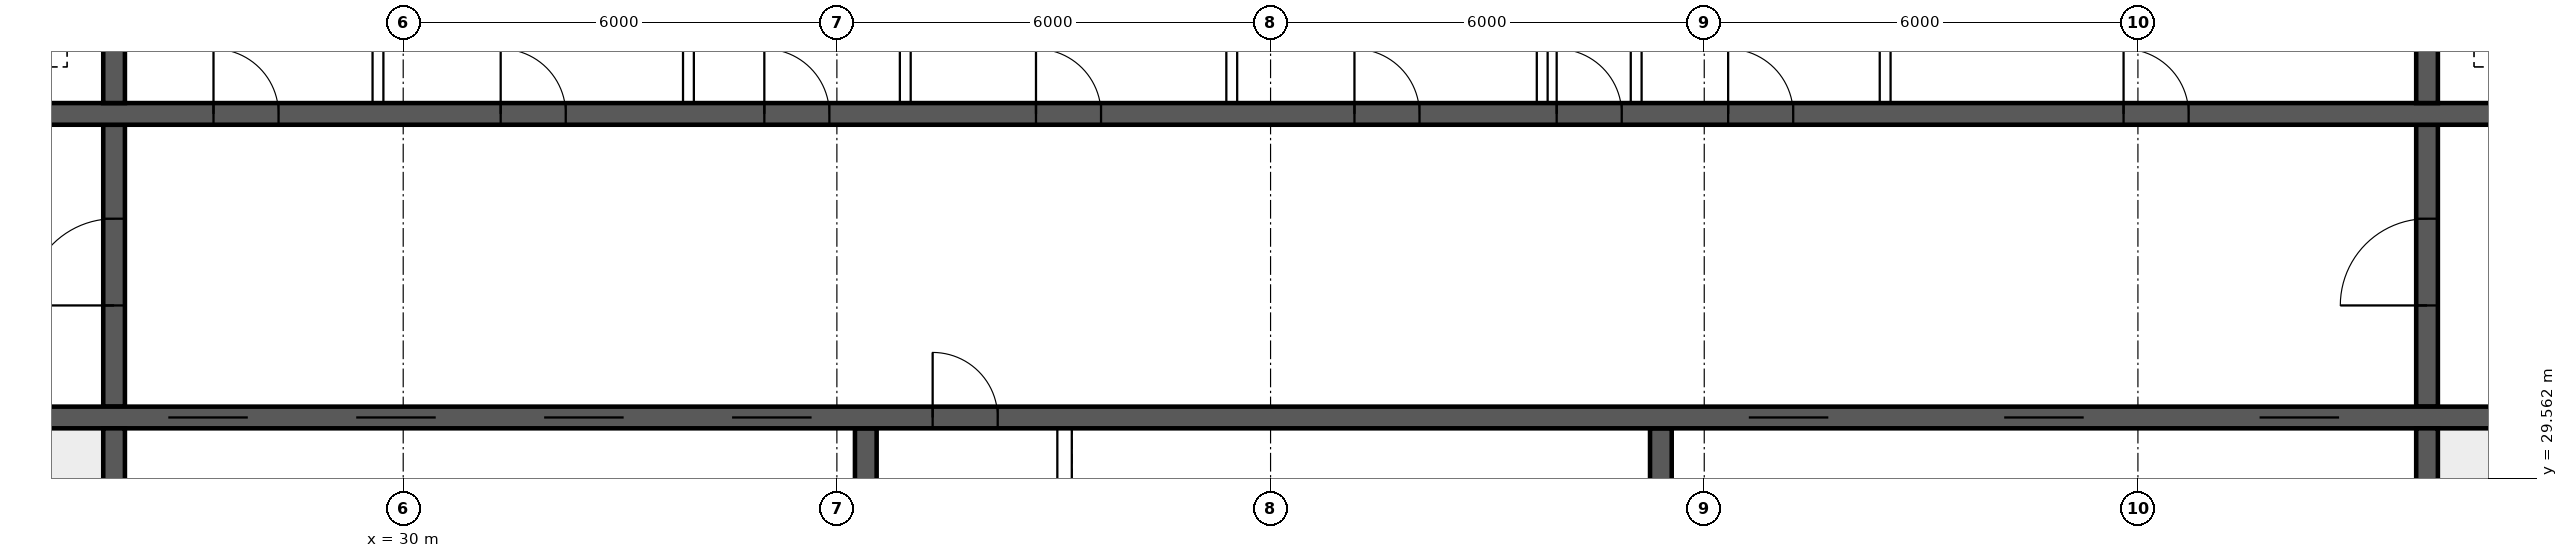
"""IFC4 building model, lengths in metres.
Left out: names, types, materials, properties, quantities, classifications, styles, units other than length and angle.
Written with IfcOpenShell. Run it as: python <this file> out.ifc"""

import sys

from ifc_helpers import new_model, si_unit, direction, frame, frame_2d, origin, place, context, subcontext, project, spatial, rectangle, extrude, element, fill, save


model = new_model("IFC4")
c1 = context("Model", 3, precision=1e-05, world=origin(), true_north=direction((0.0, 1.0)))
c2 = subcontext(c1, "Body", "Model", "MODEL_VIEW")
j1 = project(units=[si_unit("LENGTHUNIT", "METRE"), si_unit("PLANEANGLEUNIT", "RADIAN")], contexts=[c1])
p1 = place(None, origin())
s1 = spatial("IfcSite", under=j1, at=p1, CompositionType="ELEMENT")
p2 = place(p1, origin())
s2 = spatial("IfcBuilding", under=s1, at=p2, CompositionType="ELEMENT")
p3 = place(p2, frame((0.0, 0.0, 110.65)))
s3 = spatial("IfcBuildingStorey", under=s2, at=p3, CompositionType="ELEMENT", Elevation=110.65)
p4 = place(p3, frame((18.475, 30.4, 0.0), z_axis=(0.0, 0.0, 1.0), x_axis=(1.0, 0.0, 0.0)))
e1 = element("IfcWall", 1, at=p4, inside=s3, PredefinedType="SHEAR", context=c2, shape_type="SweptSolid", body=[
    extrude(rectangle(XDim=47.05, YDim=0.3, at=frame_2d((23.525, 0.0))), origin(), (0.0, 0.0, 1.0), 3.75),
])
p5 = place(p4, frame((0.4, 0.0, 0.0)))
e2 = element("IfcOpeningElement", 2, at=p5, cuts=e1, PredefinedType="OPENING", context=c2, shape_type="SweptSolid", body=[
    extrude(rectangle(XDim=1.0, YDim=2.1, at=frame_2d((0.5, 1.05))), frame((0.0, 0.16, 0.0), z_axis=(0.0, -1.0, 0.0), x_axis=(1.0, 0.0, 0.0)), (0.0, 0.0, 1.0), 0.32),
])
p6 = place(p4, frame((45.65, 0.0, 0.0)))
e3 = element("IfcOpeningElement", 3, at=p6, cuts=e1, PredefinedType="OPENING", context=c2, shape_type="SweptSolid", body=[
    extrude(rectangle(XDim=1.0, YDim=2.1, at=frame_2d((0.5, 1.05))), frame((0.0, 0.16, 0.0), z_axis=(0.0, -1.0, 0.0), x_axis=(1.0, 0.0, 0.0)), (0.0, 0.0, 1.0), 0.32),
])
p7 = place(p4, frame((8.275, 0.0, 0.0)))
e4 = element("IfcOpeningElement", 4, at=p7, cuts=e1, PredefinedType="OPENING", context=c2, shape_type="SweptSolid", body=[
    extrude(rectangle(XDim=1.1, YDim=2.1, at=frame_2d((0.55, 1.05))), frame((0.0, 0.16, 0.0), z_axis=(0.0, -1.0, 0.0), x_axis=(1.0, 0.0, 0.0)), (0.0, 0.0, 1.0), 0.32),
])
p8 = place(p4, frame((10.875, 0.0, 0.0)))
e5 = element("IfcOpeningElement", 5, at=p8, cuts=e1, PredefinedType="OPENING", context=c2, shape_type="SweptSolid", body=[
    extrude(rectangle(XDim=1.1, YDim=2.1, at=frame_2d((0.55, 1.05))), frame((0.0, 0.16, 0.0), z_axis=(0.0, -1.0, 0.0), x_axis=(1.0, 0.0, 0.0)), (0.0, 0.0, 1.0), 0.32),
])
p9 = place(p4, frame((13.475, 0.0, 0.0)))
e6 = element("IfcOpeningElement", 6, at=p9, cuts=e1, PredefinedType="OPENING", context=c2, shape_type="SweptSolid", body=[
    extrude(rectangle(XDim=1.1, YDim=2.1, at=frame_2d((0.55, 1.05))), frame((0.0, 0.16, 0.0), z_axis=(0.0, -1.0, 0.0), x_axis=(1.0, 0.0, 0.0)), (0.0, 0.0, 1.0), 0.32),
])
p10 = place(p4, frame((16.075, 0.0, 0.0)))
e7 = element("IfcOpeningElement", 7, at=p10, cuts=e1, PredefinedType="OPENING", context=c2, shape_type="SweptSolid", body=[
    extrude(rectangle(XDim=1.1, YDim=2.1, at=frame_2d((0.55, 1.05))), frame((0.0, 0.16, 0.0), z_axis=(0.0, -1.0, 0.0), x_axis=(1.0, 0.0, 0.0)), (0.0, 0.0, 1.0), 0.32),
])
p11 = place(p4, frame((18.85, 0.0, 0.0)))
e8 = element("IfcOpeningElement", 8, at=p11, cuts=e1, PredefinedType="OPENING", context=c2, shape_type="SweptSolid", body=[
    extrude(rectangle(XDim=0.9, YDim=2.1, at=frame_2d((0.45, 1.05))), frame((0.0, 0.16, 0.0), z_axis=(0.0, -1.0, 0.0), x_axis=(1.0, 0.0, 0.0)), (0.0, 0.0, 1.0), 0.32),
])
p12 = place(p4, frame((30.142, 0.0, 0.0)))
e9 = element("IfcOpeningElement", 9, at=p12, cuts=e1, PredefinedType="OPENING", context=c2, shape_type="SweptSolid", body=[
    extrude(rectangle(XDim=1.1, YDim=2.1, at=frame_2d((0.55, 1.05))), frame((0.0, 0.16, 0.0), z_axis=(0.0, -1.0, 0.0), x_axis=(1.0, 0.0, 0.0)), (0.0, 0.0, 1.0), 0.32),
])
p13 = place(p4, frame((33.675, 0.0, 0.0)))
e10 = element("IfcOpeningElement", 10, at=p13, cuts=e1, PredefinedType="OPENING", context=c2, shape_type="SweptSolid", body=[
    extrude(rectangle(XDim=1.1, YDim=2.1, at=frame_2d((0.55, 1.05))), frame((0.0, 0.16, 0.0), z_axis=(0.0, -1.0, 0.0), x_axis=(1.0, 0.0, 0.0)), (0.0, 0.0, 1.0), 0.32),
])
p14 = place(p4, frame((37.208, 0.0, 0.0)))
e11 = element("IfcOpeningElement", 11, at=p14, cuts=e1, PredefinedType="OPENING", context=c2, shape_type="SweptSolid", body=[
    extrude(rectangle(XDim=1.1, YDim=2.1, at=frame_2d((0.55, 1.05))), frame((0.0, 0.16, 0.0), z_axis=(0.0, -1.0, 0.0), x_axis=(1.0, 0.0, 0.0)), (0.0, 0.0, 1.0), 0.32),
])
p15 = place(p3, frame((18.475, 34.6, 0.0), z_axis=(0.0, 0.0, 1.0), x_axis=(1.0, 0.0, 0.0)))
e12 = element("IfcWall", 12, at=p15, inside=s3, PredefinedType="SHEAR", context=c2, shape_type="SweptSolid", body=[
    extrude(rectangle(XDim=47.05, YDim=0.3, at=frame_2d((23.525, 0.0))), origin(), (0.0, 0.0, 1.0), 3.75),
])
p16 = place(p15, frame((0.9, 0.0, 0.0)))
e13 = element("IfcOpeningElement", 13, at=p16, cuts=e12, PredefinedType="OPENING", context=c2, shape_type="SweptSolid", body=[
    extrude(rectangle(XDim=1.1, YDim=2.1, at=frame_2d((0.55, 1.05))), frame((0.0, 0.16, 0.0), z_axis=(0.0, -1.0, 0.0), x_axis=(1.0, 0.0, 0.0)), (0.0, 0.0, 1.0), 0.32),
])
p17 = place(p15, frame((45.05, 0.0, 0.0)))
e14 = element("IfcOpeningElement", 14, at=p17, cuts=e12, PredefinedType="OPENING", context=c2, shape_type="SweptSolid", body=[
    extrude(rectangle(XDim=1.1, YDim=2.1, at=frame_2d((0.55, 1.05))), frame((0.0, 0.16, 0.0), z_axis=(0.0, -1.0, 0.0), x_axis=(1.0, 0.0, 0.0)), (0.0, 0.0, 1.0), 0.32),
])
p18 = place(p15, frame((4.125, 0.0, 0.0)))
e15 = element("IfcOpeningElement", 15, at=p18, cuts=e12, PredefinedType="OPENING", context=c2, shape_type="SweptSolid", body=[
    extrude(rectangle(XDim=0.9, YDim=2.1, at=frame_2d((0.45, 1.05))), frame((0.0, 0.16, 0.0), z_axis=(0.0, -1.0, 0.0), x_axis=(1.0, 0.0, 0.0)), (0.0, 0.0, 1.0), 0.32),
])
p19 = place(p15, frame((42.025, 0.0, 0.0)))
e16 = element("IfcOpeningElement", 16, at=p19, cuts=e12, PredefinedType="OPENING", context=c2, shape_type="SweptSolid", body=[
    extrude(rectangle(XDim=0.9, YDim=2.1, at=frame_2d((0.45, 1.05))), frame((0.0, 0.16, 0.0), z_axis=(0.0, -1.0, 0.0), x_axis=(1.0, 0.0, 0.0)), (0.0, 0.0, 1.0), 0.32),
])
p20 = place(p15, frame((8.9, 0.0, 0.0)))
e17 = element("IfcOpeningElement", 17, at=p20, cuts=e12, PredefinedType="OPENING", context=c2, shape_type="SweptSolid", body=[
    extrude(rectangle(XDim=0.9, YDim=2.1, at=frame_2d((0.45, 1.05))), frame((0.0, 0.16, 0.0), z_axis=(0.0, -1.0, 0.0), x_axis=(1.0, 0.0, 0.0)), (0.0, 0.0, 1.0), 0.32),
])
p21 = place(p15, frame((12.874, 0.0, 0.0)))
e18 = element("IfcOpeningElement", 18, at=p21, cuts=e12, PredefinedType="OPENING", context=c2, shape_type="SweptSolid", body=[
    extrude(rectangle(XDim=0.9, YDim=2.1, at=frame_2d((0.45, 1.05))), frame((0.0, 0.16, 0.0), z_axis=(0.0, -1.0, 0.0), x_axis=(1.0, 0.0, 0.0)), (0.0, 0.0, 1.0), 0.32),
])
p22 = place(p15, frame((16.521, 0.0, 0.0)))
e19 = element("IfcOpeningElement", 19, at=p22, cuts=e12, PredefinedType="OPENING", context=c2, shape_type="SweptSolid", body=[
    extrude(rectangle(XDim=0.9, YDim=2.1, at=frame_2d((0.45, 1.05))), frame((0.0, 0.16, 0.0), z_axis=(0.0, -1.0, 0.0), x_axis=(1.0, 0.0, 0.0)), (0.0, 0.0, 1.0), 0.32),
])
p23 = place(p15, frame((20.28, 0.0, 0.0)))
e20 = element("IfcOpeningElement", 20, at=p23, cuts=e12, PredefinedType="OPENING", context=c2, shape_type="SweptSolid", body=[
    extrude(rectangle(XDim=0.9, YDim=2.1, at=frame_2d((0.45, 1.05))), frame((0.0, 0.16, 0.0), z_axis=(0.0, -1.0, 0.0), x_axis=(1.0, 0.0, 0.0)), (0.0, 0.0, 1.0), 0.32),
])
p24 = place(p15, frame((24.686, 0.0, 0.0)))
e21 = element("IfcOpeningElement", 21, at=p24, cuts=e12, PredefinedType="OPENING", context=c2, shape_type="SweptSolid", body=[
    extrude(rectangle(XDim=0.9, YDim=2.1, at=frame_2d((0.45, 1.05))), frame((0.0, 0.16, 0.0), z_axis=(0.0, -1.0, 0.0), x_axis=(1.0, 0.0, 0.0)), (0.0, 0.0, 1.0), 0.32),
])
p25 = place(p15, frame((27.483, 0.0, 0.0)))
e22 = element("IfcOpeningElement", 22, at=p25, cuts=e12, PredefinedType="OPENING", context=c2, shape_type="SweptSolid", body=[
    extrude(rectangle(XDim=0.9, YDim=2.1, at=frame_2d((0.45, 1.05))), frame((0.0, 0.16, 0.0), z_axis=(0.0, -1.0, 0.0), x_axis=(1.0, 0.0, 0.0)), (0.0, 0.0, 1.0), 0.32),
])
p26 = place(p15, frame((29.856, 0.0, 0.0)))
e23 = element("IfcOpeningElement", 23, at=p26, cuts=e12, PredefinedType="OPENING", context=c2, shape_type="SweptSolid", body=[
    extrude(rectangle(XDim=0.9, YDim=2.1, at=frame_2d((0.45, 1.05))), frame((0.0, 0.16, 0.0), z_axis=(0.0, -1.0, 0.0), x_axis=(1.0, 0.0, 0.0)), (0.0, 0.0, 1.0), 0.32),
])
p27 = place(p15, frame((35.326, 0.0, 0.0)))
e24 = element("IfcOpeningElement", 24, at=p27, cuts=e12, PredefinedType="OPENING", context=c2, shape_type="SweptSolid", body=[
    extrude(rectangle(XDim=0.9, YDim=2.1, at=frame_2d((0.45, 1.05))), frame((0.0, 0.16, 0.0), z_axis=(0.0, -1.0, 0.0), x_axis=(1.0, 0.0, 0.0)), (0.0, 0.0, 1.0), 0.32),
])
for number, where, z_axis, x_axis in (
    (25, (26.0, 26.275, 0.0), (0.0, 0.0, 1.0), (0.0, 1.0, 0.0)),
    (26, (58.0, 26.275, 0.0), (0.0, 0.0, 1.0), (0.0, 1.0, 0.0)),
):
    element("IfcWall", number, at=place(p3, frame(where, z_axis=z_axis, x_axis=x_axis)), inside=s3, PredefinedType="SHEAR", context=c2, shape_type="SweptSolid", body=[
        extrude(rectangle(XDim=3.975, YDim=0.3, at=frame_2d((1.988, 0.0))), origin(), (0.0, 0.0, 1.0), 3.75),
    ])
p28 = place(p3, frame((26.0, 30.55, 0.0), z_axis=(0.0, 0.0, 1.0), x_axis=(0.0, 1.0, 0.0)))
e27 = element("IfcWall", 27, at=p28, inside=s3, PredefinedType="SHEAR", context=c2, shape_type="SweptSolid", body=[
    extrude(rectangle(XDim=3.9, YDim=0.3, at=frame_2d((1.95, 0.0))), origin(), (0.0, 0.0, 1.0), 3.75),
])
p29 = place(p28, frame((1.4, 0.0, 0.0)))
e28 = element("IfcOpeningElement", 28, at=p29, cuts=e27, PredefinedType="OPENING", context=c2, shape_type="SweptSolid", body=[
    extrude(rectangle(XDim=1.2, YDim=2.1, at=frame_2d((0.6, 1.05))), frame((0.0, 0.16, 0.0), z_axis=(0.0, -1.0, 0.0), x_axis=(1.0, 0.0, 0.0)), (0.0, 0.0, 1.0), 0.32),
])
p30 = place(p3, frame((58.0, 30.55, 0.0), z_axis=(0.0, 0.0, 1.0), x_axis=(0.0, 1.0, 0.0)))
e29 = element("IfcWall", 29, at=p30, inside=s3, PredefinedType="SHEAR", context=c2, shape_type="SweptSolid", body=[
    extrude(rectangle(XDim=3.9, YDim=0.3, at=frame_2d((1.95, 0.0))), origin(), (0.0, 0.0, 1.0), 3.75),
])
p31 = place(p30, frame((1.4, 0.0, 0.0)))
e30 = element("IfcOpeningElement", 30, at=p31, cuts=e29, PredefinedType="OPENING", context=c2, shape_type="SweptSolid", body=[
    extrude(rectangle(XDim=1.2, YDim=2.1, at=frame_2d((0.6, 1.05))), frame((0.0, 0.16, 0.0), z_axis=(0.0, -1.0, 0.0), x_axis=(1.0, 0.0, 0.0)), (0.0, 0.0, 1.0), 0.32),
])
for number, where, z_axis, x_axis in (
    (31, (26.0, 34.75, 0.0), (0.0, 0.0, 1.0), (0.0, 1.0, 0.0)),
    (32, (58.0, 34.75, 0.0), (0.0, 0.0, 1.0), (0.0, 1.0, 0.0)),
):
    element("IfcWall", number, at=place(p3, frame(where, z_axis=z_axis, x_axis=x_axis)), inside=s3, PredefinedType="SHEAR", context=c2, shape_type="SweptSolid", body=[
        extrude(rectangle(XDim=2.975, YDim=0.3, at=frame_2d((1.488, 0.0))), origin(), (0.0, 0.0, 1.0), 3.75),
    ])
for number, where, z_axis, x_axis in (
    (33, (36.4, 26.275, 0.0), (0.0, 0.0, 1.0), (0.0, 1.0, 0.0)),
    (34, (47.4, 26.275, 0.0), (0.0, 0.0, 1.0), (0.0, 1.0, 0.0)),
):
    element("IfcWall", number, at=place(p3, frame(where, z_axis=z_axis, x_axis=x_axis)), inside=s3, PredefinedType="SHEAR", context=c2, shape_type="SweptSolid", body=[
        extrude(rectangle(XDim=3.975, YDim=0.3, at=frame_2d((1.988, 0.0))), origin(), (0.0, 0.0, 1.0), 3.75),
    ])
for number, where, z_axis, x_axis in (
    (35, (29.651, 34.75, 0.0), (0.0, 0.0, 1.0), (0.0, 1.0, 0.0)),
    (36, (33.946, 34.75, 0.0), (0.0, 0.0, 1.0), (0.0, 1.0, 0.0)),
    (37, (36.946, 34.75, 0.0), (0.0, 0.0, 1.0), (0.0, 1.0, 0.0)),
    (38, (41.463, 34.75, 0.0), (0.0, 0.0, 1.0), (0.0, 1.0, 0.0)),
    (39, (45.758, 34.75, 0.0), (0.0, 0.0, 1.0), (0.0, 1.0, 0.0)),
    (40, (47.058, 34.75, 0.0), (0.0, 0.0, 1.0), (0.0, 1.0, 0.0)),
    (41, (50.503, 34.75, 0.0), (0.0, 0.0, 1.0), (0.0, 1.0, 0.0)),
):
    element("IfcWall", number, at=place(p3, frame(where, z_axis=z_axis, x_axis=x_axis)), inside=s3, PredefinedType="SOLIDWALL", context=c2, shape_type="SweptSolid", body=[
        extrude(rectangle(XDim=2.975, YDim=0.15, at=frame_2d((1.488, 0.0))), origin(), (0.0, 0.0, 1.0), 3.3),
    ])
p32 = place(p3, frame((39.15, 26.275, 0.0), z_axis=(0.0, 0.0, 1.0), x_axis=(0.0, 1.0, 0.0)))
e42 = element("IfcWall", 42, at=p32, inside=s3, PredefinedType="SOLIDWALL", context=c2, shape_type="SweptSolid", body=[
    extrude(rectangle(XDim=3.975, YDim=0.2, at=frame_2d((1.988, 0.0))), origin(), (0.0, 0.0, 1.0), 3.3),
])
p33 = place(p29, origin())
e43 = element("IfcDoor", 43, at=p33, inside=s3, OperationType="SINGLE_SWING_LEFT", PredefinedType="DOOR", context=c2, shape_type="SweptSolid", body=[
    extrude(rectangle(XDim=1.2, YDim=2.1, at=frame_2d((0.6, 1.05))), frame((0.0, 0.025, 0.0), z_axis=(0.0, -1.0, 0.0), x_axis=(1.0, 0.0, 0.0)), (0.0, 0.0, 1.0), 0.05),
])
fill(e28, e43)
p34 = place(p31, origin())
e44 = element("IfcDoor", 44, at=p34, inside=s3, OperationType="SINGLE_SWING_LEFT", PredefinedType="DOOR", context=c2, shape_type="SweptSolid", body=[
    extrude(rectangle(XDim=1.2, YDim=2.1, at=frame_2d((0.6, 1.05))), frame((0.0, 0.025, 0.0), z_axis=(0.0, -1.0, 0.0), x_axis=(1.0, 0.0, 0.0)), (0.0, 0.0, 1.0), 0.05),
])
fill(e30, e44)
p35 = place(p20, origin())
e45 = element("IfcDoor", 45, at=p35, inside=s3, OperationType="SINGLE_SWING_LEFT", PredefinedType="DOOR", context=c2, shape_type="SweptSolid", body=[
    extrude(rectangle(XDim=0.9, YDim=2.1, at=frame_2d((0.45, 1.05))), frame((0.0, 0.025, 0.0), z_axis=(0.0, -1.0, 0.0), x_axis=(1.0, 0.0, 0.0)), (0.0, 0.0, 1.0), 0.05),
])
fill(e17, e45)
p36 = place(p21, origin())
e46 = element("IfcDoor", 46, at=p36, inside=s3, OperationType="SINGLE_SWING_LEFT", PredefinedType="DOOR", context=c2, shape_type="SweptSolid", body=[
    extrude(rectangle(XDim=0.9, YDim=2.1, at=frame_2d((0.45, 1.05))), frame((0.0, 0.025, 0.0), z_axis=(0.0, -1.0, 0.0), x_axis=(1.0, 0.0, 0.0)), (0.0, 0.0, 1.0), 0.05),
])
fill(e18, e46)
p37 = place(p22, origin())
e47 = element("IfcDoor", 47, at=p37, inside=s3, OperationType="SINGLE_SWING_LEFT", PredefinedType="DOOR", context=c2, shape_type="SweptSolid", body=[
    extrude(rectangle(XDim=0.9, YDim=2.1, at=frame_2d((0.45, 1.05))), frame((0.0, 0.025, 0.0), z_axis=(0.0, -1.0, 0.0), x_axis=(1.0, 0.0, 0.0)), (0.0, 0.0, 1.0), 0.05),
])
fill(e19, e47)
p38 = place(p23, origin())
e48 = element("IfcDoor", 48, at=p38, inside=s3, OperationType="SINGLE_SWING_LEFT", PredefinedType="DOOR", context=c2, shape_type="SweptSolid", body=[
    extrude(rectangle(XDim=0.9, YDim=2.1, at=frame_2d((0.45, 1.05))), frame((0.0, 0.025, 0.0), z_axis=(0.0, -1.0, 0.0), x_axis=(1.0, 0.0, 0.0)), (0.0, 0.0, 1.0), 0.05),
])
fill(e20, e48)
p39 = place(p24, origin())
e49 = element("IfcDoor", 49, at=p39, inside=s3, OperationType="SINGLE_SWING_LEFT", PredefinedType="DOOR", context=c2, shape_type="SweptSolid", body=[
    extrude(rectangle(XDim=0.9, YDim=2.1, at=frame_2d((0.45, 1.05))), frame((0.0, 0.025, 0.0), z_axis=(0.0, -1.0, 0.0), x_axis=(1.0, 0.0, 0.0)), (0.0, 0.0, 1.0), 0.05),
])
fill(e21, e49)
p40 = place(p25, origin())
e50 = element("IfcDoor", 50, at=p40, inside=s3, OperationType="SINGLE_SWING_LEFT", PredefinedType="DOOR", context=c2, shape_type="SweptSolid", body=[
    extrude(rectangle(XDim=0.9, YDim=2.1, at=frame_2d((0.45, 1.05))), frame((0.0, 0.025, 0.0), z_axis=(0.0, -1.0, 0.0), x_axis=(1.0, 0.0, 0.0)), (0.0, 0.0, 1.0), 0.05),
])
fill(e22, e50)
p41 = place(p26, origin())
e51 = element("IfcDoor", 51, at=p41, inside=s3, OperationType="SINGLE_SWING_LEFT", PredefinedType="DOOR", context=c2, shape_type="SweptSolid", body=[
    extrude(rectangle(XDim=0.9, YDim=2.1, at=frame_2d((0.45, 1.05))), frame((0.0, 0.025, 0.0), z_axis=(0.0, -1.0, 0.0), x_axis=(1.0, 0.0, 0.0)), (0.0, 0.0, 1.0), 0.05),
])
fill(e23, e51)
p42 = place(p27, origin())
e52 = element("IfcDoor", 52, at=p42, inside=s3, OperationType="SINGLE_SWING_LEFT", PredefinedType="DOOR", context=c2, shape_type="SweptSolid", body=[
    extrude(rectangle(XDim=0.9, YDim=2.1, at=frame_2d((0.45, 1.05))), frame((0.0, 0.025, 0.0), z_axis=(0.0, -1.0, 0.0), x_axis=(1.0, 0.0, 0.0)), (0.0, 0.0, 1.0), 0.05),
])
fill(e24, e52)
p43 = place(p7, origin())
e53 = element("IfcDoor", 53, at=p43, inside=s3, OperationType="DOUBLE_DOOR_SLIDING", PredefinedType="DOOR", context=c2, shape_type="SweptSolid", body=[
    extrude(rectangle(XDim=1.1, YDim=2.1, at=frame_2d((0.55, 1.05))), frame((0.0, 0.025, 0.0), z_axis=(0.0, -1.0, 0.0), x_axis=(1.0, 0.0, 0.0)), (0.0, 0.0, 1.0), 0.05),
])
fill(e4, e53)
p44 = place(p8, origin())
e54 = element("IfcDoor", 54, at=p44, inside=s3, OperationType="DOUBLE_DOOR_SLIDING", PredefinedType="DOOR", context=c2, shape_type="SweptSolid", body=[
    extrude(rectangle(XDim=1.1, YDim=2.1, at=frame_2d((0.55, 1.05))), frame((0.0, 0.025, 0.0), z_axis=(0.0, -1.0, 0.0), x_axis=(1.0, 0.0, 0.0)), (0.0, 0.0, 1.0), 0.05),
])
fill(e5, e54)
p45 = place(p9, origin())
e55 = element("IfcDoor", 55, at=p45, inside=s3, OperationType="DOUBLE_DOOR_SLIDING", PredefinedType="DOOR", context=c2, shape_type="SweptSolid", body=[
    extrude(rectangle(XDim=1.1, YDim=2.1, at=frame_2d((0.55, 1.05))), frame((0.0, 0.025, 0.0), z_axis=(0.0, -1.0, 0.0), x_axis=(1.0, 0.0, 0.0)), (0.0, 0.0, 1.0), 0.05),
])
fill(e6, e55)
p46 = place(p10, origin())
e56 = element("IfcDoor", 56, at=p46, inside=s3, OperationType="DOUBLE_DOOR_SLIDING", PredefinedType="DOOR", context=c2, shape_type="SweptSolid", body=[
    extrude(rectangle(XDim=1.1, YDim=2.1, at=frame_2d((0.55, 1.05))), frame((0.0, 0.025, 0.0), z_axis=(0.0, -1.0, 0.0), x_axis=(1.0, 0.0, 0.0)), (0.0, 0.0, 1.0), 0.05),
])
fill(e7, e56)
p47 = place(p11, origin())
e57 = element("IfcDoor", 57, at=p47, inside=s3, OperationType="SINGLE_SWING_LEFT", PredefinedType="DOOR", context=c2, shape_type="SweptSolid", body=[
    extrude(rectangle(XDim=0.9, YDim=2.1, at=frame_2d((0.45, 1.05))), frame((0.0, 0.025, 0.0), z_axis=(0.0, -1.0, 0.0), x_axis=(1.0, 0.0, 0.0)), (0.0, 0.0, 1.0), 0.05),
])
fill(e8, e57)
p48 = place(p12, origin())
e58 = element("IfcDoor", 58, at=p48, inside=s3, OperationType="DOUBLE_DOOR_SLIDING", PredefinedType="DOOR", context=c2, shape_type="SweptSolid", body=[
    extrude(rectangle(XDim=1.1, YDim=2.1, at=frame_2d((0.55, 1.05))), frame((0.0, 0.025, 0.0), z_axis=(0.0, -1.0, 0.0), x_axis=(1.0, 0.0, 0.0)), (0.0, 0.0, 1.0), 0.05),
])
fill(e9, e58)
p49 = place(p13, origin())
e59 = element("IfcDoor", 59, at=p49, inside=s3, OperationType="DOUBLE_DOOR_SLIDING", PredefinedType="DOOR", context=c2, shape_type="SweptSolid", body=[
    extrude(rectangle(XDim=1.1, YDim=2.1, at=frame_2d((0.55, 1.05))), frame((0.0, 0.025, 0.0), z_axis=(0.0, -1.0, 0.0), x_axis=(1.0, 0.0, 0.0)), (0.0, 0.0, 1.0), 0.05),
])
fill(e10, e59)
p50 = place(p14, origin())
e60 = element("IfcDoor", 60, at=p50, inside=s3, OperationType="DOUBLE_DOOR_SLIDING", PredefinedType="DOOR", context=c2, shape_type="SweptSolid", body=[
    extrude(rectangle(XDim=1.1, YDim=2.1, at=frame_2d((0.55, 1.05))), frame((0.0, 0.025, 0.0), z_axis=(0.0, -1.0, 0.0), x_axis=(1.0, 0.0, 0.0)), (0.0, 0.0, 1.0), 0.05),
])
fill(e11, e60)
save(model, sys.argv[1])
